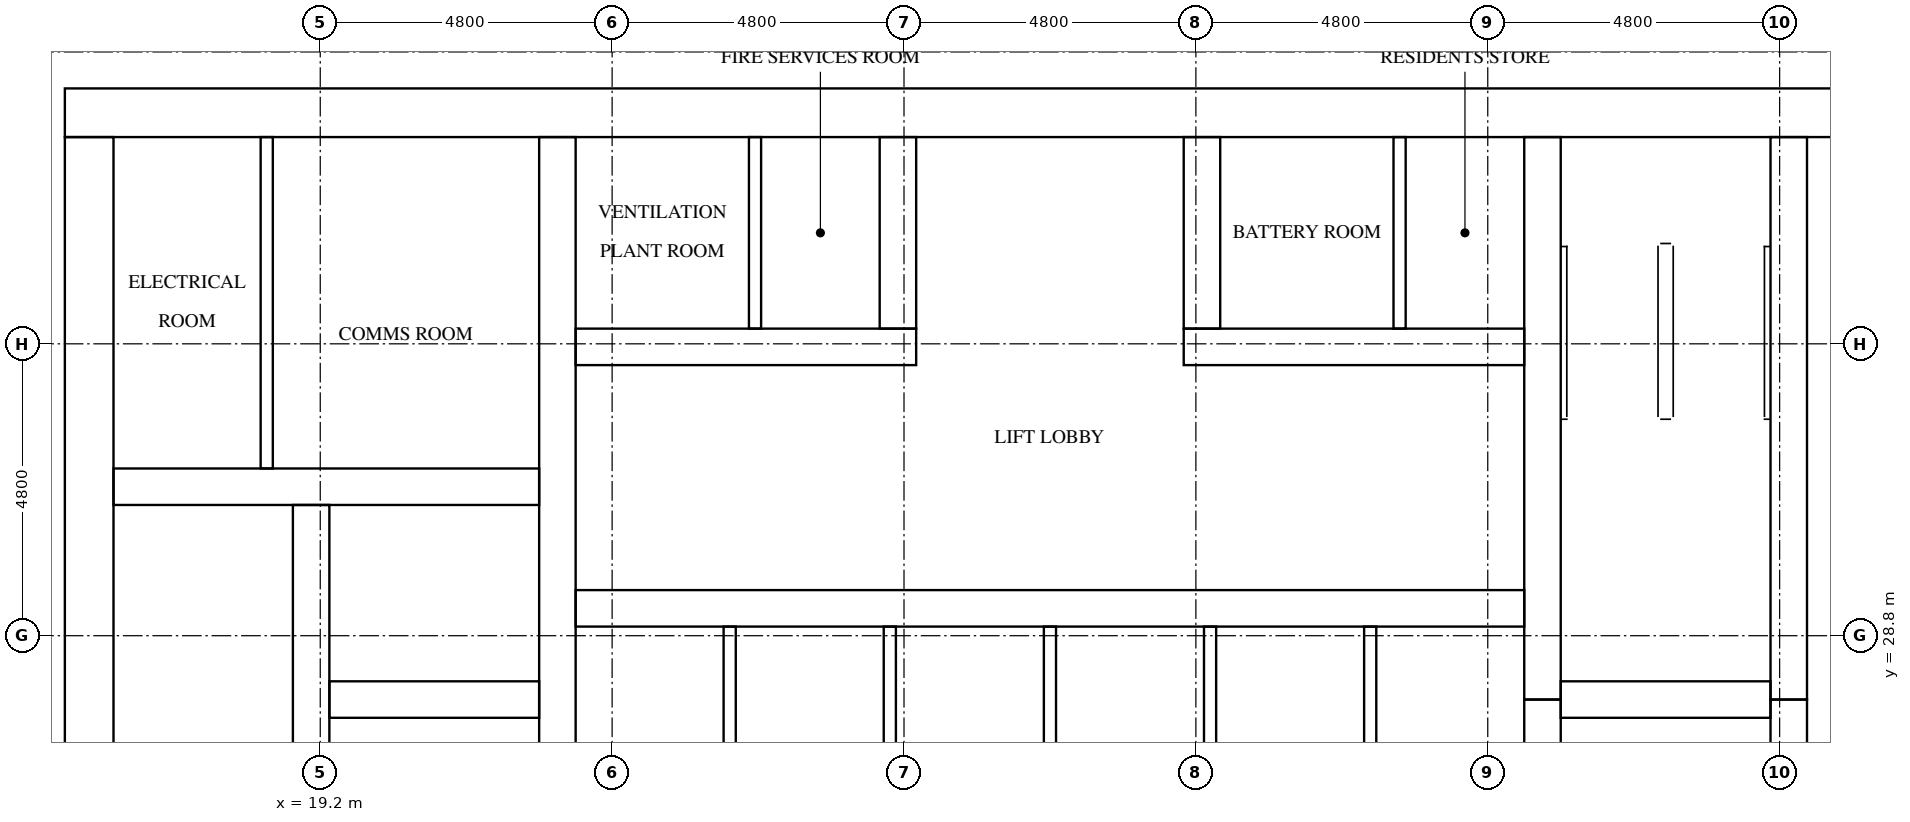
"""IFC4 building model, lengths in metres.
Left out: names, types, materials, properties, quantities, classifications, styles, units other than length and angle.
Written with IfcOpenShell. Run it as: python <this file> out.ifc"""

import sys

from ifc_helpers import new_model, si_unit, direction, frame, frame_2d, origin, place, context, subcontext, project, spatial, rectangle, extrude, element, fill, save


model = new_model("IFC4")
c1 = context("Model", 3, precision=1e-05, world=origin(), true_north=direction((0.0, 1.0)))
c2 = subcontext(c1, "Body", "Model", "MODEL_VIEW")
j1 = project(units=[si_unit("LENGTHUNIT", "METRE"), si_unit("PLANEANGLEUNIT", "RADIAN")], contexts=[c1])
p1 = place(None, origin())
s1 = spatial("IfcSite", under=j1, at=p1, CompositionType="ELEMENT")
p2 = place(p1, origin())
s2 = spatial("IfcBuilding", under=s1, at=p2, CompositionType="ELEMENT")
p3 = place(p2, frame((0.0, 0.0, 149.0)))
s3 = spatial("IfcBuildingStorey", under=s2, at=p3, CompositionType="ELEMENT", Elevation=149.0)
p4 = place(p3, frame((15.0, 37.4, 0.0), z_axis=(0.0, 0.0, 1.0), x_axis=(1.0, 0.0, 0.0)))
e1 = element("IfcWall", 1, at=p4, inside=s3, PredefinedType="SHEAR", context=c2, shape_type="SweptSolid", body=[
    extrude(rectangle(XDim=32.4, YDim=0.8, at=frame_2d((16.2, 0.0))), origin(), (0.0, 0.0, 1.0), 3.2),
])
p5 = place(p4, frame((15.3, 0.0, 0.0)))
e2 = element("IfcOpeningElement", 2, at=p5, cuts=e1, PredefinedType="OPENING", context=c2, shape_type="SweptSolid", body=[
    extrude(rectangle(XDim=1.8, YDim=2.1, at=frame_2d((0.9, 1.05))), frame((0.0, 0.41, 0.0), z_axis=(0.0, -1.0, 0.0), x_axis=(1.0, 0.0, 0.0)), (0.0, 0.0, 1.0), 0.82),
])
p6 = place(p4, frame((1.51, 0.0, 0.0)))
e3 = element("IfcOpeningElement", 3, at=p6, cuts=e1, PredefinedType="OPENING", context=c2, shape_type="SweptSolid", body=[
    extrude(rectangle(XDim=1.0, YDim=2.1, at=frame_2d((0.5, 1.05))), frame((0.0, 0.41, 0.0), z_axis=(0.0, -1.0, 0.0), x_axis=(1.0, 0.0, 0.0)), (0.0, 0.0, 1.0), 0.82),
])
p7 = place(p4, frame((5.11, 0.0, 0.0)))
e4 = element("IfcOpeningElement", 4, at=p7, cuts=e1, PredefinedType="OPENING", context=c2, shape_type="SweptSolid", body=[
    extrude(rectangle(XDim=1.0, YDim=2.1, at=frame_2d((0.5, 1.05))), frame((0.0, 0.41, 0.0), z_axis=(0.0, -1.0, 0.0), x_axis=(1.0, 0.0, 0.0)), (0.0, 0.0, 1.0), 0.82),
])
p8 = place(p3, frame((15.4, 15.8, 0.0), z_axis=(0.0, 0.0, 1.0), x_axis=(0.0, 1.0, 0.0)))
e5 = element("IfcWall", 5, at=p8, inside=s3, PredefinedType="SHEAR", context=c2, shape_type="SweptSolid", body=[
    extrude(rectangle(XDim=21.2, YDim=0.8, at=frame_2d((10.6, 0.0))), origin(), (0.0, 0.0, 1.0), 3.2),
])
p9 = place(p8, frame((4.96, 0.0, 0.0)))
e6 = element("IfcOpeningElement", 6, at=p9, cuts=e5, PredefinedType="OPENING", context=c2, shape_type="SweptSolid", body=[
    extrude(rectangle(XDim=1.2, YDim=2.1, at=frame_2d((0.6, 1.05))), frame((0.0, 0.41, 0.0), z_axis=(0.0, -1.0, 0.0), x_axis=(1.0, 0.0, 0.0)), (0.0, 0.0, 1.0), 0.82),
])
p10 = place(p3, frame((19.05, 15.8, 0.0), z_axis=(0.0, 0.0, 1.0), x_axis=(0.0, 1.0, 0.0)))
e7 = element("IfcWall", 7, at=p10, inside=s3, PredefinedType="SHEAR", context=c2, shape_type="SweptSolid", body=[
    extrude(rectangle(XDim=15.15, YDim=0.6, at=frame_2d((7.575, 0.0))), origin(), (0.0, 0.0, 1.0), 3.2),
])
p11 = place(p10, frame((9.65, 0.0, 0.0)))
e8 = element("IfcOpeningElement", 8, at=p11, cuts=e7, PredefinedType="OPENING", context=c2, shape_type="SweptSolid", body=[
    extrude(rectangle(XDim=1.1, YDim=2.1, at=frame_2d((0.55, 1.05))), frame((0.0, 0.31, 0.0), z_axis=(0.0, -1.0, 0.0), x_axis=(1.0, 0.0, 0.0)), (0.0, 0.0, 1.0), 0.62),
])
p12 = place(p10, frame((13.15, 0.0, 0.0)))
e9 = element("IfcOpeningElement", 9, at=p12, cuts=e7, PredefinedType="OPENING", context=c2, shape_type="SweptSolid", body=[
    extrude(rectangle(XDim=1.1, YDim=2.1, at=frame_2d((0.55, 1.05))), frame((0.0, 0.31, 0.0), z_axis=(0.0, -1.0, 0.0), x_axis=(1.0, 0.0, 0.0)), (0.0, 0.0, 1.0), 0.62),
])
p13 = place(p10, frame((0.4, 0.0, 0.0)))
e10 = element("IfcOpeningElement", 10, at=p13, cuts=e7, PredefinedType="OPENING", context=c2, shape_type="SweptSolid", body=[
    extrude(rectangle(XDim=1.2, YDim=2.1, at=frame_2d((0.6, 1.05))), frame((0.0, 0.31, 0.0), z_axis=(0.0, -1.0, 0.0), x_axis=(1.0, 0.0, 0.0)), (0.0, 0.0, 1.0), 0.62),
])
p14 = place(p3, frame((23.1, 15.8, 0.0), z_axis=(0.0, 0.0, 1.0), x_axis=(0.0, 1.0, 0.0)))
e11 = element("IfcWall", 11, at=p14, inside=s3, PredefinedType="SHEAR", context=c2, shape_type="SweptSolid", body=[
    extrude(rectangle(XDim=21.2, YDim=0.6, at=frame_2d((10.6, 0.0))), origin(), (0.0, 0.0, 1.0), 3.2),
])
p15 = place(p3, frame((39.3, 24.25, 0.0), z_axis=(0.0, 0.0, 1.0), x_axis=(0.0, 1.0, 0.0)))
e12 = element("IfcWall", 12, at=p15, inside=s3, PredefinedType="SHEAR", context=c2, shape_type="SweptSolid", body=[
    extrude(rectangle(XDim=3.5, YDim=0.6, at=frame_2d((1.75, 0.0))), origin(), (0.0, 0.0, 1.0), 3.2),
])
p16 = place(p3, frame((39.3, 27.75, 0.0), z_axis=(0.0, 0.0, 1.0), x_axis=(0.0, 1.0, 0.0)))
e13 = element("IfcWall", 13, at=p16, inside=s3, PredefinedType="SHEAR", context=c2, shape_type="SweptSolid", body=[
    extrude(rectangle(XDim=9.25, YDim=0.6, at=frame_2d((4.625, 0.0))), origin(), (0.0, 0.0, 1.0), 3.2),
])
p17 = place(p3, frame((43.35, 24.25, 0.0), z_axis=(0.0, 0.0, 1.0), x_axis=(0.0, 1.0, 0.0)))
e14 = element("IfcWall", 14, at=p17, inside=s3, PredefinedType="SHEAR", context=c2, shape_type="SweptSolid", body=[
    extrude(rectangle(XDim=3.5, YDim=0.6, at=frame_2d((1.75, 0.0))), origin(), (0.0, 0.0, 1.0), 3.2),
])
p18 = place(p17, frame((1.2, 0.0, 0.0)))
e15 = element("IfcOpeningElement", 15, at=p18, cuts=e14, PredefinedType="OPENING", context=c2, shape_type="SweptSolid", body=[
    extrude(rectangle(XDim=1.1, YDim=2.1, at=frame_2d((0.55, 1.05))), frame((0.0, 0.31, 0.0), z_axis=(0.0, -1.0, 0.0), x_axis=(1.0, 0.0, 0.0)), (0.0, 0.0, 1.0), 0.62),
])
p19 = place(p3, frame((43.35, 27.75, 0.0), z_axis=(0.0, 0.0, 1.0), x_axis=(0.0, 1.0, 0.0)))
e16 = element("IfcWall", 16, at=p19, inside=s3, PredefinedType="SHEAR", context=c2, shape_type="SweptSolid", body=[
    extrude(rectangle(XDim=9.25, YDim=0.6, at=frame_2d((4.625, 0.0))), origin(), (0.0, 0.0, 1.0), 3.2),
])
p20 = place(p19, frame((7.65, 0.0, 0.0)))
e17 = element("IfcOpeningElement", 17, at=p20, cuts=e16, PredefinedType="OPENING", context=c2, shape_type="SweptSolid", body=[
    extrude(rectangle(XDim=1.2, YDim=2.1, at=frame_2d((0.6, 1.05))), frame((0.0, 0.31, 0.0), z_axis=(0.0, -1.0, 0.0), x_axis=(1.0, 0.0, 0.0)), (0.0, 0.0, 1.0), 0.62),
])
p21 = place(p3, frame((19.35, 27.75, 0.0), z_axis=(0.0, 0.0, 1.0), x_axis=(1.0, 0.0, 0.0)))
e18 = element("IfcWall", 18, at=p21, inside=s3, PredefinedType="SHEAR", context=c2, shape_type="SweptSolid", body=[
    extrude(rectangle(XDim=3.45, YDim=0.6, at=frame_2d((1.725, 0.0))), origin(), (0.0, 0.0, 1.0), 3.2),
])
p22 = place(p3, frame((15.8, 31.25, 0.0), z_axis=(0.0, 0.0, 1.0), x_axis=(1.0, 0.0, 0.0)))
e19 = element("IfcWall", 19, at=p22, inside=s3, PredefinedType="SHEAR", context=c2, shape_type="SweptSolid", body=[
    extrude(rectangle(XDim=7.0, YDim=0.6, at=frame_2d((3.5, 0.0))), origin(), (0.0, 0.0, 1.0), 3.2),
])
p23 = place(p3, frame((39.6, 27.75, 0.0), z_axis=(0.0, 0.0, 1.0), x_axis=(1.0, 0.0, 0.0)))
e20 = element("IfcWall", 20, at=p23, inside=s3, PredefinedType="SHEAR", context=c2, shape_type="SweptSolid", body=[
    extrude(rectangle(XDim=3.45, YDim=0.6, at=frame_2d((1.725, 0.0))), origin(), (0.0, 0.0, 1.0), 3.2),
])
p24 = place(p3, frame((23.4, 29.25, 0.0), z_axis=(0.0, 0.0, 1.0), x_axis=(1.0, 0.0, 0.0)))
e21 = element("IfcWall", 21, at=p24, inside=s3, PredefinedType="SHEAR", context=c2, shape_type="SweptSolid", body=[
    extrude(rectangle(XDim=15.6, YDim=0.6, at=frame_2d((7.8, 0.0))), origin(), (0.0, 0.0, 1.0), 3.2),
])
p25 = place(p24, frame((0.667, 0.0, 0.0)))
e22 = element("IfcOpeningElement", 22, at=p25, cuts=e21, PredefinedType="OPENING", context=c2, shape_type="SweptSolid", body=[
    extrude(rectangle(XDim=1.1, YDim=2.1, at=frame_2d((0.55, 1.05))), frame((0.0, 0.31, 0.0), z_axis=(0.0, -1.0, 0.0), x_axis=(1.0, 0.0, 0.0)), (0.0, 0.0, 1.0), 0.62),
])
p26 = place(p24, frame((3.3, 0.0, 0.0)))
e23 = element("IfcOpeningElement", 23, at=p26, cuts=e21, PredefinedType="OPENING", context=c2, shape_type="SweptSolid", body=[
    extrude(rectangle(XDim=1.1, YDim=2.1, at=frame_2d((0.55, 1.05))), frame((0.0, 0.31, 0.0), z_axis=(0.0, -1.0, 0.0), x_axis=(1.0, 0.0, 0.0)), (0.0, 0.0, 1.0), 0.62),
])
p27 = place(p24, frame((5.933, 0.0, 0.0)))
e24 = element("IfcOpeningElement", 24, at=p27, cuts=e21, PredefinedType="OPENING", context=c2, shape_type="SweptSolid", body=[
    extrude(rectangle(XDim=1.1, YDim=2.1, at=frame_2d((0.55, 1.05))), frame((0.0, 0.31, 0.0), z_axis=(0.0, -1.0, 0.0), x_axis=(1.0, 0.0, 0.0)), (0.0, 0.0, 1.0), 0.62),
])
p28 = place(p24, frame((8.567, 0.0, 0.0)))
e25 = element("IfcOpeningElement", 25, at=p28, cuts=e21, PredefinedType="OPENING", context=c2, shape_type="SweptSolid", body=[
    extrude(rectangle(XDim=1.1, YDim=2.1, at=frame_2d((0.55, 1.05))), frame((0.0, 0.31, 0.0), z_axis=(0.0, -1.0, 0.0), x_axis=(1.0, 0.0, 0.0)), (0.0, 0.0, 1.0), 0.62),
])
p29 = place(p24, frame((11.2, 0.0, 0.0)))
e26 = element("IfcOpeningElement", 26, at=p29, cuts=e21, PredefinedType="OPENING", context=c2, shape_type="SweptSolid", body=[
    extrude(rectangle(XDim=1.1, YDim=2.1, at=frame_2d((0.55, 1.05))), frame((0.0, 0.31, 0.0), z_axis=(0.0, -1.0, 0.0), x_axis=(1.0, 0.0, 0.0)), (0.0, 0.0, 1.0), 0.62),
])
p30 = place(p24, frame((13.833, 0.0, 0.0)))
e27 = element("IfcOpeningElement", 27, at=p30, cuts=e21, PredefinedType="OPENING", context=c2, shape_type="SweptSolid", body=[
    extrude(rectangle(XDim=1.1, YDim=2.1, at=frame_2d((0.55, 1.05))), frame((0.0, 0.31, 0.0), z_axis=(0.0, -1.0, 0.0), x_axis=(1.0, 0.0, 0.0)), (0.0, 0.0, 1.0), 0.62),
])
p31 = place(p3, frame((23.4, 33.55, 0.0), z_axis=(0.0, 0.0, 1.0), x_axis=(1.0, 0.0, 0.0)))
e28 = element("IfcWall", 28, at=p31, inside=s3, PredefinedType="SHEAR", context=c2, shape_type="SweptSolid", body=[
    extrude(rectangle(XDim=5.6, YDim=0.6, at=frame_2d((2.8, 0.0))), origin(), (0.0, 0.0, 1.0), 3.2),
])
p32 = place(p31, frame((0.925, 0.0, 0.0)))
e29 = element("IfcOpeningElement", 29, at=p32, cuts=e28, PredefinedType="OPENING", context=c2, shape_type="SweptSolid", body=[
    extrude(rectangle(XDim=1.0, YDim=2.1, at=frame_2d((0.5, 1.05))), frame((0.0, 0.31, 0.0), z_axis=(0.0, -1.0, 0.0), x_axis=(1.0, 0.0, 0.0)), (0.0, 0.0, 1.0), 0.62),
])
p33 = place(p31, frame((3.525, 0.0, 0.0)))
e30 = element("IfcOpeningElement", 30, at=p33, cuts=e28, PredefinedType="OPENING", context=c2, shape_type="SweptSolid", body=[
    extrude(rectangle(XDim=1.0, YDim=2.1, at=frame_2d((0.5, 1.05))), frame((0.0, 0.31, 0.0), z_axis=(0.0, -1.0, 0.0), x_axis=(1.0, 0.0, 0.0)), (0.0, 0.0, 1.0), 0.62),
])
p34 = place(p3, frame((33.4, 33.55, 0.0), z_axis=(0.0, 0.0, 1.0), x_axis=(1.0, 0.0, 0.0)))
e31 = element("IfcWall", 31, at=p34, inside=s3, PredefinedType="SHEAR", context=c2, shape_type="SweptSolid", body=[
    extrude(rectangle(XDim=5.6, YDim=0.6, at=frame_2d((2.8, 0.0))), origin(), (0.0, 0.0, 1.0), 3.2),
])
p35 = place(p34, frame((1.525, 0.0, 0.0)))
e32 = element("IfcOpeningElement", 32, at=p35, cuts=e31, PredefinedType="OPENING", context=c2, shape_type="SweptSolid", body=[
    extrude(rectangle(XDim=1.0, YDim=2.1, at=frame_2d((0.5, 1.05))), frame((0.0, 0.31, 0.0), z_axis=(0.0, -1.0, 0.0), x_axis=(1.0, 0.0, 0.0)), (0.0, 0.0, 1.0), 0.62),
])
p36 = place(p34, frame((4.125, 0.0, 0.0)))
e33 = element("IfcOpeningElement", 33, at=p36, cuts=e31, PredefinedType="OPENING", context=c2, shape_type="SweptSolid", body=[
    extrude(rectangle(XDim=1.0, YDim=2.1, at=frame_2d((0.5, 1.05))), frame((0.0, 0.31, 0.0), z_axis=(0.0, -1.0, 0.0), x_axis=(1.0, 0.0, 0.0)), (0.0, 0.0, 1.0), 0.62),
])
for number, where, z_axis, x_axis in (
    (34, (28.7, 33.85, 0.0), (0.0, 0.0, 1.0), (0.0, 1.0, 0.0)),
    (35, (33.7, 33.85, 0.0), (0.0, 0.0, 1.0), (0.0, 1.0, 0.0)),
):
    element("IfcWall", number, at=place(p3, frame(where, z_axis=z_axis, x_axis=x_axis)), inside=s3, PredefinedType="SHEAR", context=c2, shape_type="SweptSolid", body=[
        extrude(rectangle(XDim=3.15, YDim=0.6, at=frame_2d((1.575, 0.0))), origin(), (0.0, 0.0, 1.0), 3.2),
    ])
for number, where, z_axis, x_axis in (
    (36, (25.933, 26.45, 0.0), (0.0, 0.0, 1.0), (0.0, 1.0, 0.0)),
    (37, (28.567, 26.45, 0.0), (0.0, 0.0, 1.0), (0.0, 1.0, 0.0)),
    (38, (31.2, 26.45, 0.0), (0.0, 0.0, 1.0), (0.0, 1.0, 0.0)),
    (39, (33.833, 26.45, 0.0), (0.0, 0.0, 1.0), (0.0, 1.0, 0.0)),
    (40, (36.467, 26.45, 0.0), (0.0, 0.0, 1.0), (0.0, 1.0, 0.0)),
):
    element("IfcWall", number, at=place(p3, frame(where, z_axis=z_axis, x_axis=x_axis)), inside=s3, PredefinedType="SOLIDWALL", context=c2, shape_type="SweptSolid", body=[
        extrude(rectangle(XDim=2.5, YDim=0.2, at=frame_2d((1.25, 0.0))), origin(), (0.0, 0.0, 1.0), 3.2),
    ])
p37 = place(p3, frame((18.32, 31.55, 0.0), z_axis=(0.0, 0.0, 1.0), x_axis=(0.0, 1.0, 0.0)))
e41 = element("IfcWall", 41, at=p37, inside=s3, PredefinedType="PARTITIONING", context=c2, shape_type="SweptSolid", body=[
    extrude(rectangle(XDim=5.45, YDim=0.2, at=frame_2d((2.725, 0.0))), origin(), (0.0, 0.0, 1.0), 3.2),
])
for number, where, z_axis, x_axis in (
    (42, (26.35, 33.85, 0.0), (0.0, 0.0, 1.0), (0.0, 1.0, 0.0)),
    (43, (36.95, 33.85, 0.0), (0.0, 0.0, 1.0), (0.0, 1.0, 0.0)),
):
    element("IfcWall", number, at=place(p3, frame(where, z_axis=z_axis, x_axis=x_axis)), inside=s3, PredefinedType="PARTITIONING", context=c2, shape_type="SweptSolid", body=[
        extrude(rectangle(XDim=3.15, YDim=0.2, at=frame_2d((1.575, 0.0))), origin(), (0.0, 0.0, 1.0), 3.2),
    ])
p38 = place(p25, origin())
e44 = element("IfcDoor", 44, at=p38, inside=s3, OperationType="DOUBLE_DOOR_SLIDING", PredefinedType="DOOR", context=c2, shape_type="SweptSolid", body=[
    extrude(rectangle(XDim=1.1, YDim=2.1, at=frame_2d((0.55, 1.05))), frame((0.0, 0.025, 0.0), z_axis=(0.0, -1.0, 0.0), x_axis=(1.0, 0.0, 0.0)), (0.0, 0.0, 1.0), 0.05),
])
fill(e22, e44)
p39 = place(p26, origin())
e45 = element("IfcDoor", 45, at=p39, inside=s3, OperationType="DOUBLE_DOOR_SLIDING", PredefinedType="DOOR", context=c2, shape_type="SweptSolid", body=[
    extrude(rectangle(XDim=1.1, YDim=2.1, at=frame_2d((0.55, 1.05))), frame((0.0, 0.025, 0.0), z_axis=(0.0, -1.0, 0.0), x_axis=(1.0, 0.0, 0.0)), (0.0, 0.0, 1.0), 0.05),
])
fill(e23, e45)
p40 = place(p27, origin())
e46 = element("IfcDoor", 46, at=p40, inside=s3, OperationType="DOUBLE_DOOR_SLIDING", PredefinedType="DOOR", context=c2, shape_type="SweptSolid", body=[
    extrude(rectangle(XDim=1.1, YDim=2.1, at=frame_2d((0.55, 1.05))), frame((0.0, 0.025, 0.0), z_axis=(0.0, -1.0, 0.0), x_axis=(1.0, 0.0, 0.0)), (0.0, 0.0, 1.0), 0.05),
])
fill(e24, e46)
p41 = place(p28, origin())
e47 = element("IfcDoor", 47, at=p41, inside=s3, OperationType="DOUBLE_DOOR_SLIDING", PredefinedType="DOOR", context=c2, shape_type="SweptSolid", body=[
    extrude(rectangle(XDim=1.1, YDim=2.1, at=frame_2d((0.55, 1.05))), frame((0.0, 0.025, 0.0), z_axis=(0.0, -1.0, 0.0), x_axis=(1.0, 0.0, 0.0)), (0.0, 0.0, 1.0), 0.05),
])
fill(e25, e47)
p42 = place(p29, origin())
e48 = element("IfcDoor", 48, at=p42, inside=s3, OperationType="DOUBLE_DOOR_SLIDING", PredefinedType="DOOR", context=c2, shape_type="SweptSolid", body=[
    extrude(rectangle(XDim=1.1, YDim=2.1, at=frame_2d((0.55, 1.05))), frame((0.0, 0.025, 0.0), z_axis=(0.0, -1.0, 0.0), x_axis=(1.0, 0.0, 0.0)), (0.0, 0.0, 1.0), 0.05),
])
fill(e26, e48)
p43 = place(p30, origin())
e49 = element("IfcDoor", 49, at=p43, inside=s3, OperationType="DOUBLE_DOOR_SLIDING", PredefinedType="DOOR", context=c2, shape_type="SweptSolid", body=[
    extrude(rectangle(XDim=1.1, YDim=2.1, at=frame_2d((0.55, 1.05))), frame((0.0, 0.025, 0.0), z_axis=(0.0, -1.0, 0.0), x_axis=(1.0, 0.0, 0.0)), (0.0, 0.0, 1.0), 0.05),
])
fill(e27, e49)
p44 = place(p12, origin())
e50 = element("IfcDoor", 50, at=p44, inside=s3, OperationType="DOUBLE_DOOR_SLIDING", PredefinedType="DOOR", context=c2, shape_type="SweptSolid", body=[
    extrude(rectangle(XDim=1.1, YDim=2.1, at=frame_2d((0.55, 1.05))), frame((0.0, 0.025, 0.0), z_axis=(0.0, -1.0, 0.0), x_axis=(1.0, 0.0, 0.0)), (0.0, 0.0, 1.0), 0.05),
])
fill(e9, e50)
p45 = place(p20, origin())
e51 = element("IfcDoor", 51, at=p45, inside=s3, OperationType="SINGLE_SWING_RIGHT", PredefinedType="DOOR", context=c2, shape_type="SweptSolid", body=[
    extrude(rectangle(XDim=1.2, YDim=2.1, at=frame_2d((0.6, 1.05))), frame((0.0, 0.025, 0.0), z_axis=(0.0, -1.0, 0.0), x_axis=(1.0, 0.0, 0.0)), (0.0, 0.0, 1.0), 0.05),
])
fill(e17, e51)
p46 = place(p5, origin())
e52 = element("IfcDoor", 52, at=p46, inside=s3, OperationType="DOUBLE_DOOR_SINGLE_SWING", PredefinedType="DOOR", context=c2, shape_type="SweptSolid", body=[
    extrude(rectangle(XDim=1.8, YDim=2.1, at=frame_2d((0.9, 1.05))), frame((0.0, 0.025, 0.0), z_axis=(0.0, -1.0, 0.0), x_axis=(1.0, 0.0, 0.0)), (0.0, 0.0, 1.0), 0.05),
])
fill(e2, e52)
p47 = place(p6, origin())
e53 = element("IfcDoor", 53, at=p47, inside=s3, OperationType="SINGLE_SWING_LEFT", PredefinedType="DOOR", context=c2, shape_type="SweptSolid", body=[
    extrude(rectangle(XDim=1.0, YDim=2.1, at=frame_2d((0.5, 1.05))), frame((0.0, 0.025, 0.0), z_axis=(0.0, -1.0, 0.0), x_axis=(1.0, 0.0, 0.0)), (0.0, 0.0, 1.0), 0.05),
])
fill(e3, e53)
p48 = place(p7, origin())
e54 = element("IfcDoor", 54, at=p48, inside=s3, OperationType="SINGLE_SWING_RIGHT", PredefinedType="DOOR", context=c2, shape_type="SweptSolid", body=[
    extrude(rectangle(XDim=1.0, YDim=2.1, at=frame_2d((0.5, 1.05))), frame((0.0, 0.025, 0.0), z_axis=(0.0, -1.0, 0.0), x_axis=(1.0, 0.0, 0.0)), (0.0, 0.0, 1.0), 0.05),
])
fill(e4, e54)
p49 = place(p32, frame((1.0, 0.0, 0.0), z_axis=(0.0, 0.0, 1.0), x_axis=(-1.0, 0.0, 0.0)))
e55 = element("IfcDoor", 55, at=p49, inside=s3, OperationType="SINGLE_SWING_RIGHT", PredefinedType="DOOR", context=c2, shape_type="SweptSolid", body=[
    extrude(rectangle(XDim=1.0, YDim=2.1, at=frame_2d((0.5, 1.05))), frame((0.0, 0.025, 0.0), z_axis=(0.0, -1.0, 0.0), x_axis=(1.0, 0.0, 0.0)), (0.0, 0.0, 1.0), 0.05),
])
fill(e29, e55)
p50 = place(p33, frame((1.0, 0.0, 0.0), z_axis=(0.0, 0.0, 1.0), x_axis=(-1.0, 0.0, 0.0)))
e56 = element("IfcDoor", 56, at=p50, inside=s3, OperationType="SINGLE_SWING_LEFT", PredefinedType="DOOR", context=c2, shape_type="SweptSolid", body=[
    extrude(rectangle(XDim=1.0, YDim=2.1, at=frame_2d((0.5, 1.05))), frame((0.0, 0.025, 0.0), z_axis=(0.0, -1.0, 0.0), x_axis=(1.0, 0.0, 0.0)), (0.0, 0.0, 1.0), 0.05),
])
fill(e30, e56)
p51 = place(p35, frame((1.0, 0.0, 0.0), z_axis=(0.0, 0.0, 1.0), x_axis=(-1.0, 0.0, 0.0)))
e57 = element("IfcDoor", 57, at=p51, inside=s3, OperationType="SINGLE_SWING_RIGHT", PredefinedType="DOOR", context=c2, shape_type="SweptSolid", body=[
    extrude(rectangle(XDim=1.0, YDim=2.1, at=frame_2d((0.5, 1.05))), frame((0.0, 0.025, 0.0), z_axis=(0.0, -1.0, 0.0), x_axis=(1.0, 0.0, 0.0)), (0.0, 0.0, 1.0), 0.05),
])
fill(e32, e57)
p52 = place(p36, frame((1.0, 0.0, 0.0), z_axis=(0.0, 0.0, 1.0), x_axis=(-1.0, 0.0, 0.0)))
e58 = element("IfcDoor", 58, at=p52, inside=s3, OperationType="SINGLE_SWING_LEFT", PredefinedType="DOOR", context=c2, shape_type="SweptSolid", body=[
    extrude(rectangle(XDim=1.0, YDim=2.1, at=frame_2d((0.5, 1.05))), frame((0.0, 0.025, 0.0), z_axis=(0.0, -1.0, 0.0), x_axis=(1.0, 0.0, 0.0)), (0.0, 0.0, 1.0), 0.05),
])
fill(e33, e58)
save(model, sys.argv[1])
